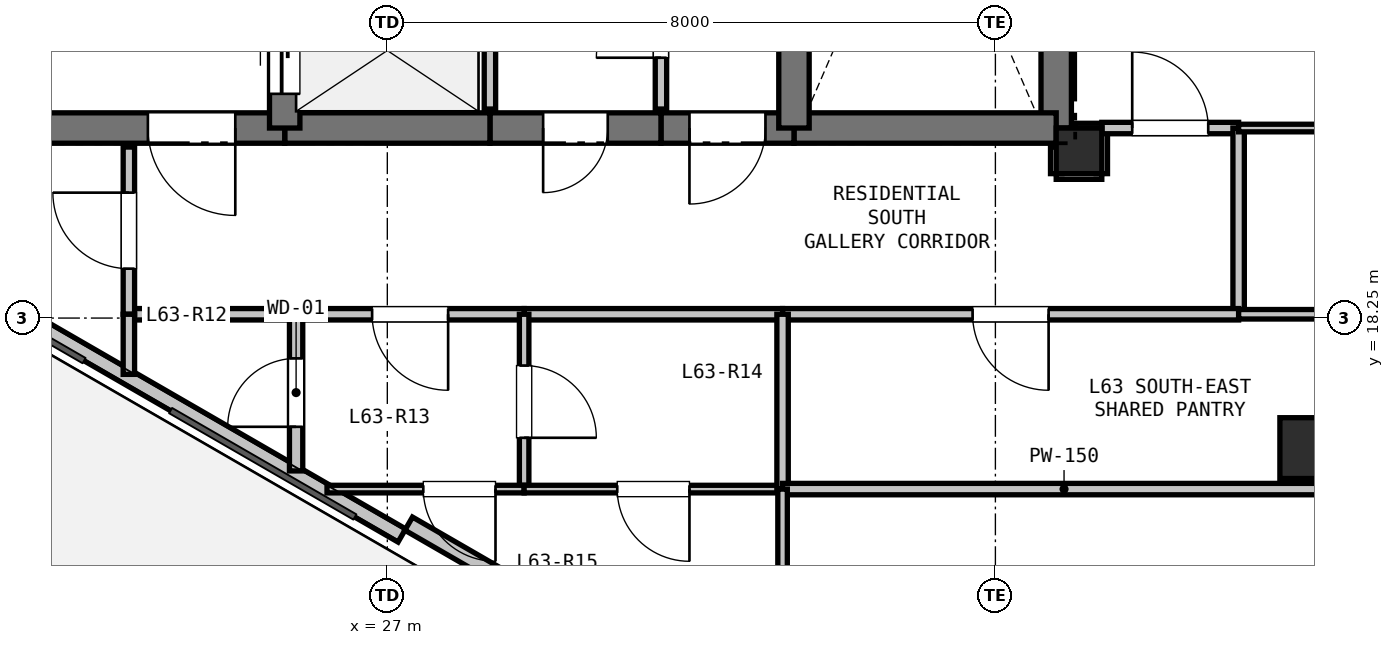
"""IFC4 building model, lengths in metres.
Left out: names, types, materials, properties, quantities, classifications, styles, units other than length and angle.
Written with IfcOpenShell. Run it as: python <this file> out.ifc"""

import sys

from ifc_helpers import new_model, si_unit, direction, frame, frame_2d, origin, origin_2d, place, context, subcontext, project, spatial, rectangle, hollow_rectangle, extrude, element, fill, save


model = new_model("IFC4")
c1 = context("Model", 3, precision=1e-05, world=origin(), true_north=direction((0.0, 1.0)))
c2 = subcontext(c1, "Body", "Model", "MODEL_VIEW")
j1 = project(units=[si_unit("LENGTHUNIT", "METRE"), si_unit("PLANEANGLEUNIT", "RADIAN")], contexts=[c1])
p1 = place(None, origin())
s1 = spatial("IfcSite", under=j1, at=p1, CompositionType="ELEMENT")
p2 = place(p1, origin())
s2 = spatial("IfcBuilding", under=s1, at=p2, CompositionType="ELEMENT")
p3 = place(p2, frame((0.0, 0.0, 226.5)))
s3 = spatial("IfcBuildingStorey", under=s2, at=p3, CompositionType="ELEMENT", Elevation=226.5)
p4 = place(p3, frame((36.1, 20.45, 0.0), z_axis=(0.0, 0.0, 1.0), x_axis=(1.0, 0.0, 0.0)))
e1 = element("IfcColumn", 1, at=p4, inside=s3, PredefinedType="COLUMN", context=c2, shape_type="SweptSolid", body=[
    extrude(rectangle(XDim=0.6, YDim=0.6, at=origin_2d()), origin(), (0.0, 0.0, 1.0), 3.3),
])
p5 = place(p3, frame((39.143, 16.539, 0.0), z_axis=(0.0, 0.0, 1.0), x_axis=(1.0, 0.0, 0.0)))
e2 = element("IfcColumn", 2, at=p5, inside=s3, PredefinedType="COLUMN", context=c2, shape_type="SweptSolid", body=[
    extrude(hollow_rectangle(XDim=0.8, YDim=0.8, WallThickness=0.025, at=origin_2d()), origin(), (0.0, 0.0, 1.0), 3.3),
])
p6 = place(p3, frame((27.191, 15.389, 0.0), z_axis=(0.0, 0.0, 1.0), x_axis=(-0.866019557082, 0.500010126649, 0.0)))
e3 = element("IfcWall", 3, at=p6, inside=s3, PredefinedType="PARAPET", context=c2, shape_type="SweptSolid", body=[
    extrude(rectangle(XDim=8.228, YDim=0.2, at=frame_2d((4.114, 0.0))), origin(), (0.0, 0.0, 1.0), 0.2),
])
p7 = place(p3, frame((28.754, 14.695, 0.0), z_axis=(0.0, 0.0, 1.0), x_axis=(-0.866025371046, 0.500000056704, 0.0)))
e4 = element("IfcWall", 4, at=p7, inside=s3, PredefinedType="PARAPET", context=c2, shape_type="SweptSolid", body=[
    extrude(rectangle(XDim=1.7, YDim=0.2, at=frame_2d((0.85, 0.0))), origin(), (0.0, 0.0, 1.0), 2.7),
])
p8 = place(p3, frame((35.8, 28.1, 0.0), z_axis=(0.0, 0.0, 1.0), x_axis=(0.0, -1.0, 0.0)))
e5 = element("IfcWall", 5, at=p8, inside=s3, PredefinedType="SHEAR", context=c2, shape_type="SweptSolid", body=[
    extrude(rectangle(XDim=7.35, YDim=0.4, at=frame_2d((3.675, 0.0))), origin(), (0.0, 0.0, 1.0), 3.08),
])
p9 = place(p3, frame((35.8, 20.75, 0.0), z_axis=(0.0, 0.0, 1.0), x_axis=(-1.0, 0.0, 0.0)))
e6 = element("IfcWall", 6, at=p9, inside=s3, PredefinedType="SHEAR", context=c2, shape_type="SweptSolid", body=[
    extrude(rectangle(XDim=3.45, YDim=0.4, at=frame_2d((1.725, 0.0))), origin(), (0.0, 0.0, 1.0), 3.08),
])
p10 = place(p3, frame((32.35, 20.75, 0.0), z_axis=(0.0, 0.0, 1.0), x_axis=(-1.0, 0.0, 0.0)))
e7 = element("IfcWall", 7, at=p10, inside=s3, PredefinedType="SHEAR", context=c2, shape_type="SweptSolid", body=[
    extrude(rectangle(XDim=1.75, YDim=0.4, at=frame_2d((0.875, 0.0))), origin(), (0.0, 0.0, 1.0), 3.08),
])
p11 = place(p10, frame((0.375, 0.0, 0.0)))
e8 = element("IfcOpeningElement", 8, at=p11, cuts=e7, PredefinedType="OPENING", context=c2, shape_type="SweptSolid", body=[
    extrude(rectangle(XDim=1.0, YDim=2.15, at=frame_2d((0.5, 1.075))), frame((0.0, 0.21, 0.0), z_axis=(0.0, -1.0, 0.0), x_axis=(1.0, 0.0, 0.0)), (0.0, 0.0, 1.0), 0.42),
])
p12 = place(p3, frame((30.6, 20.75, 0.0), z_axis=(0.0, 0.0, 1.0), x_axis=(-1.0, 0.0, 0.0)))
e9 = element("IfcWall", 9, at=p12, inside=s3, PredefinedType="SHEAR", context=c2, shape_type="SweptSolid", body=[
    extrude(rectangle(XDim=2.25, YDim=0.4, at=frame_2d((1.125, 0.0))), origin(), (0.0, 0.0, 1.0), 3.08),
])
p13 = place(p12, frame((0.7, 0.0, 0.0)))
e10 = element("IfcOpeningElement", 10, at=p13, cuts=e9, PredefinedType="OPENING", context=c2, shape_type="SweptSolid", body=[
    extrude(rectangle(XDim=0.85, YDim=2.1, at=frame_2d((0.425, 1.05))), frame((0.0, 0.21, 0.0), z_axis=(0.0, -1.0, 0.0), x_axis=(1.0, 0.0, 0.0)), (0.0, 0.0, 1.0), 0.42),
])
p14 = place(p3, frame((28.35, 20.75, 0.0), z_axis=(0.0, 0.0, 1.0), x_axis=(-1.0, 0.0, 0.0)))
e11 = element("IfcWall", 11, at=p14, inside=s3, PredefinedType="SHEAR", context=c2, shape_type="SweptSolid", body=[
    extrude(rectangle(XDim=2.7, YDim=0.4, at=frame_2d((1.35, 0.0))), origin(), (0.0, 0.0, 1.0), 3.08),
])
p15 = place(p3, frame((25.65, 20.75, 0.0), z_axis=(0.0, 0.0, 1.0), x_axis=(-1.0, 0.0, 0.0)))
e12 = element("IfcWall", 12, at=p15, inside=s3, PredefinedType="SHEAR", context=c2, shape_type="SweptSolid", body=[
    extrude(rectangle(XDim=3.45, YDim=0.4, at=frame_2d((1.725, 0.0))), origin(), (0.0, 0.0, 1.0), 3.08),
])
p16 = place(p15, frame((0.65, 0.0, 0.0)))
e13 = element("IfcOpeningElement", 13, at=p16, cuts=e12, PredefinedType="OPENING", context=c2, shape_type="SweptSolid", body=[
    extrude(rectangle(XDim=1.15, YDim=2.15, at=frame_2d((0.575, 1.075))), frame((0.0, 0.21, 0.0), z_axis=(0.0, -1.0, 0.0), x_axis=(1.0, 0.0, 0.0)), (0.0, 0.0, 1.0), 0.42),
])
p17 = place(p3, frame((25.65, 20.75, 0.0), z_axis=(0.0, 0.0, 1.0), x_axis=(0.0, 1.0, 0.0)))
e14 = element("IfcWall", 14, at=p17, inside=s3, PredefinedType="SHEAR", context=c2, shape_type="SweptSolid", body=[
    extrude(rectangle(XDim=2.0, YDim=0.4, at=frame_2d((1.0, 0.0))), origin(), (0.0, 0.0, 1.0), 3.08),
])
p18 = place(p17, frame((0.45, 0.0, 0.0)))
e15 = element("IfcOpeningElement", 15, at=p18, cuts=e14, PredefinedType="OPENING", context=c2, shape_type="SweptSolid", body=[
    extrude(rectangle(XDim=1.1, YDim=2.15, at=frame_2d((0.55, 1.075))), frame((0.0, 0.21, 0.0), z_axis=(0.0, -1.0, 0.0), x_axis=(1.0, 0.0, 0.0)), (0.0, 0.0, 1.0), 0.42),
])
p19 = place(p3, frame((32.35, 20.75, 0.0), z_axis=(0.0, 0.0, 1.0), x_axis=(0.0, 1.0, 0.0)))
e16 = element("IfcWall", 16, at=p19, inside=s3, PredefinedType="SHEAR", context=c2, shape_type="SweptSolid", body=[
    extrude(rectangle(XDim=4.8, YDim=0.4, at=frame_2d((2.4, 0.0))), origin(), (0.0, 0.0, 1.0), 3.08),
])
p20 = place(p3, frame((28.35, 23.2, 0.0), z_axis=(0.0, 0.0, 1.0), x_axis=(0.0, -1.0, 0.0)))
e17 = element("IfcWall", 17, at=p20, inside=s3, PredefinedType="PARTITIONING", context=c2, shape_type="SweptSolid", body=[
    extrude(rectangle(XDim=2.2, YDim=0.15, at=frame_2d((1.1, 0.0))), origin(), (0.0, 0.0, 1.0), 3.08),
])
p21 = place(p3, frame((30.6, 21.0, 0.0), z_axis=(0.0, 0.0, 1.0), x_axis=(0.0, 1.0, 0.0)))
e18 = element("IfcWall", 18, at=p21, inside=s3, PredefinedType="PARTITIONING", context=c2, shape_type="SweptSolid", body=[
    extrude(rectangle(XDim=2.2, YDim=0.15, at=frame_2d((1.1, 0.0))), origin(), (0.0, 0.0, 1.0), 3.08),
])
p22 = place(p21, frame((0.675, 0.0, 0.0)))
e19 = element("IfcOpeningElement", 19, at=p22, cuts=e18, PredefinedType="OPENING", context=c2, shape_type="SweptSolid", body=[
    extrude(rectangle(XDim=0.85, YDim=2.1, at=frame_2d((0.425, 1.05))), frame((0.0, 0.085, 0.0), z_axis=(0.0, -1.0, 0.0), x_axis=(1.0, 0.0, 0.0)), (0.0, 0.0, 1.0), 0.17),
])
p23 = place(p3, frame((35.8, 20.15, 0.0), z_axis=(0.0, 0.0, 1.0), x_axis=(1.0, 0.0, 0.0)))
e20 = element("IfcWall", 20, at=p23, inside=s3, PredefinedType="PARTITIONING", context=c2, shape_type="SweptSolid", body=[
    extrude(rectangle(XDim=0.6, YDim=0.15, at=frame_2d((0.3, 0.0))), origin(), (0.0, 0.0, 1.0), 2.528),
])
p24 = place(p3, frame((36.4, 20.15, 0.0), z_axis=(0.0, 0.0, 1.0), x_axis=(0.0, 1.0, 0.0)))
e21 = element("IfcWall", 21, at=p24, inside=s3, PredefinedType="PARTITIONING", context=c2, shape_type="SweptSolid", body=[
    extrude(rectangle(XDim=0.6, YDim=0.15, at=frame_2d((0.3, 0.0))), origin(), (0.0, 0.0, 1.0), 3.08),
])
p25 = place(p3, frame((36.4, 20.75, 0.0), z_axis=(0.0, 0.0, 1.0), x_axis=(1.0, 0.0, 0.0)))
e22 = element("IfcWall", 22, at=p25, inside=s3, PredefinedType="PARTITIONING", context=c2, shape_type="SweptSolid", body=[
    extrude(rectangle(XDim=1.8, YDim=0.15, at=frame_2d((0.9, 0.0))), origin(), (0.0, 0.0, 1.0), 3.08),
])
p26 = place(p25, frame((0.4, 0.0, 0.0)))
e23 = element("IfcOpeningElement", 23, at=p26, cuts=e22, PredefinedType="OPENING", context=c2, shape_type="SweptSolid", body=[
    extrude(rectangle(XDim=1.0, YDim=2.15, at=frame_2d((0.5, 1.075))), frame((0.0, 0.085, 0.0), z_axis=(0.0, -1.0, 0.0), x_axis=(1.0, 0.0, 0.0)), (0.0, 0.0, 1.0), 0.17),
])
p27 = place(p3, frame((38.2, 20.75, 0.0), z_axis=(0.0, 0.0, 1.0), x_axis=(0.0, -1.0, 0.0)))
e24 = element("IfcWall", 24, at=p27, inside=s3, PredefinedType="PARTITIONING", context=c2, shape_type="SweptSolid", body=[
    extrude(rectangle(XDim=2.45, YDim=0.15, at=frame_2d((1.225, 0.0))), origin(), (0.0, 0.0, 1.0), 3.08),
])
p28 = place(p3, frame((38.2, 18.3, 0.0), z_axis=(0.0, 0.0, 1.0), x_axis=(-1.0, 0.0, 0.0)))
e25 = element("IfcWall", 25, at=p28, inside=s3, PredefinedType="PARTITIONING", context=c2, shape_type="SweptSolid", body=[
    extrude(rectangle(XDim=6.0, YDim=0.15, at=frame_2d((3.0, 0.0))), origin(), (0.0, 0.0, 1.0), 2.528),
])
p29 = place(p28, frame((2.5, 0.0, 0.0)))
e26 = element("IfcOpeningElement", 26, at=p29, cuts=e25, PredefinedType="OPENING", context=c2, shape_type="SweptSolid", body=[
    extrude(rectangle(XDim=1.0, YDim=2.15, at=frame_2d((0.5, 1.075))), frame((0.0, 0.085, 0.0), z_axis=(0.0, -1.0, 0.0), x_axis=(1.0, 0.0, 0.0)), (0.0, 0.0, 1.0), 0.17),
])
p30 = place(p3, frame((32.2, 18.3, 0.0), z_axis=(0.0, 0.0, 1.0), x_axis=(-1.0, 0.0, 0.0)))
e27 = element("IfcWall", 27, at=p30, inside=s3, PredefinedType="PARTITIONING", context=c2, shape_type="SweptSolid", body=[
    extrude(rectangle(XDim=3.4, YDim=0.15, at=frame_2d((1.7, 0.0))), origin(), (0.0, 0.0, 1.0), 3.08),
])
p31 = place(p3, frame((28.8, 18.3, 0.0), z_axis=(0.0, 0.0, 1.0), x_axis=(-1.0, 0.0, 0.0)))
e28 = element("IfcWall", 28, at=p31, inside=s3, PredefinedType="PARTITIONING", context=c2, shape_type="SweptSolid", body=[
    extrude(rectangle(XDim=3.0, YDim=0.15, at=frame_2d((1.5, 0.0))), origin(), (0.0, 0.0, 1.0), 3.08),
])
p32 = place(p31, frame((1.0, 0.0, 0.0)))
e29 = element("IfcOpeningElement", 29, at=p32, cuts=e28, PredefinedType="OPENING", context=c2, shape_type="SweptSolid", body=[
    extrude(rectangle(XDim=1.0, YDim=2.15, at=frame_2d((0.5, 1.075))), frame((0.0, 0.085, 0.0), z_axis=(0.0, -1.0, 0.0), x_axis=(1.0, 0.0, 0.0)), (0.0, 0.0, 1.0), 0.17),
])
p33 = place(p3, frame((25.8, 18.3, 0.0), z_axis=(0.0, 0.0, 1.0), x_axis=(-1.0, 0.0, 0.0)))
e30 = element("IfcWall", 30, at=p33, inside=s3, PredefinedType="PARTITIONING", context=c2, shape_type="SweptSolid", body=[
    extrude(rectangle(XDim=2.2, YDim=0.15, at=frame_2d((1.1, 0.0))), origin(), (0.0, 0.0, 1.0), 2.365),
])
p34 = place(p3, frame((23.6, 18.3, 0.0), z_axis=(0.0, 0.0, 1.0), x_axis=(0.0, 1.0, 0.0)))
e31 = element("IfcWall", 31, at=p34, inside=s3, PredefinedType="PARTITIONING", context=c2, shape_type="SweptSolid", body=[
    extrude(rectangle(XDim=2.2, YDim=0.15, at=frame_2d((1.1, 0.0))), origin(), (0.0, 0.0, 1.0), 2.528),
])
p35 = place(p34, frame((0.6, 0.0, 0.0)))
e32 = element("IfcOpeningElement", 32, at=p35, cuts=e31, PredefinedType="OPENING", context=c2, shape_type="SweptSolid", body=[
    extrude(rectangle(XDim=1.0, YDim=2.15, at=frame_2d((0.5, 1.075))), frame((0.0, 0.085, 0.0), z_axis=(0.0, -1.0, 0.0), x_axis=(1.0, 0.0, 0.0)), (0.0, 0.0, 1.0), 0.17),
])
p36 = place(p3, frame((35.8, 20.5, 0.0), z_axis=(0.0, 0.0, 1.0), x_axis=(0.0, -1.0, 0.0)))
e33 = element("IfcWall", 33, at=p36, inside=s3, PredefinedType="PARTITIONING", context=c2, shape_type="SweptSolid", body=[
    extrude(rectangle(XDim=0.35, YDim=0.15, at=frame_2d((0.175, 0.0))), origin(), (0.0, 0.0, 1.0), 2.605),
])
p37 = place(p3, frame((28.8, 18.3, 0.0), z_axis=(0.0, 0.0, 1.0), x_axis=(0.0, -1.0, 0.0)))
e34 = element("IfcWall", 34, at=p37, inside=s3, PredefinedType="PARTITIONING", context=c2, shape_type="SweptSolid", body=[
    extrude(rectangle(XDim=2.3, YDim=0.125, at=frame_2d((1.15, 0.0))), origin(), (0.0, 0.0, 1.0), 3.08),
])
p38 = place(p37, frame((0.675, 0.0, 0.0)))
e35 = element("IfcOpeningElement", 35, at=p38, cuts=e34, PredefinedType="OPENING", context=c2, shape_type="SweptSolid", body=[
    extrude(rectangle(XDim=0.95, YDim=2.1, at=frame_2d((0.475, 1.05))), frame((0.0, 0.073, 0.0), z_axis=(0.0, -1.0, 0.0), x_axis=(1.0, 0.0, 0.0)), (0.0, 0.0, 1.0), 0.145),
])
p39 = place(p3, frame((28.8, 16.0, 0.0), z_axis=(0.0, 0.0, 1.0), x_axis=(-1.0, 0.0, 0.0)))
e36 = element("IfcWall", 36, at=p39, inside=s3, PredefinedType="PARTITIONING", context=c2, shape_type="SweptSolid", body=[
    extrude(rectangle(XDim=2.594, YDim=0.1, at=frame_2d((1.297, 0.0))), origin(), (0.0, 0.0, 1.0), 2.365),
])
p40 = place(p39, frame((0.377, 0.0, 0.0)))
e37 = element("IfcOpeningElement", 37, at=p40, cuts=e36, PredefinedType="OPENING", context=c2, shape_type="SweptSolid", body=[
    extrude(rectangle(XDim=0.95, YDim=2.1, at=frame_2d((0.475, 1.05))), frame((0.0, 0.06, 0.0), z_axis=(0.0, -1.0, 0.0), x_axis=(1.0, 0.0, 0.0)), (0.0, 0.0, 1.0), 0.12),
])
p41 = place(p3, frame((25.8, 16.239, 0.0), z_axis=(0.0, 0.0, 1.0), x_axis=(0.0, 1.0, 0.0)))
e38 = element("IfcWall", 38, at=p41, inside=s3, PredefinedType="PLUMBINGWALL", context=c2, shape_type="SweptSolid", body=[
    extrude(rectangle(XDim=2.061, YDim=0.175, at=frame_2d((1.031, 0.0))), origin(), (0.0, 0.0, 1.0), 2.365),
])
p42 = place(p41, frame((0.581, 0.0, 0.0)))
e39 = element("IfcOpeningElement", 39, at=p42, cuts=e38, PredefinedType="OPENING", context=c2, shape_type="SweptSolid", body=[
    extrude(rectangle(XDim=0.9, YDim=2.1, at=frame_2d((0.45, 1.05))), frame((0.0, 0.097, 0.0), z_axis=(0.0, -1.0, 0.0), x_axis=(1.0, 0.0, 0.0)), (0.0, 0.0, 1.0), 0.195),
])
p43 = place(p3, frame((23.6, 17.509, 0.0), z_axis=(0.0, 0.0, 1.0), x_axis=(0.0, 1.0, 0.0)))
e40 = element("IfcWall", 40, at=p43, inside=s3, PredefinedType="PARTITIONING", context=c2, shape_type="SweptSolid", body=[
    extrude(rectangle(XDim=0.791, YDim=0.15, at=frame_2d((0.396, 0.0))), origin(), (0.0, 0.0, 1.0), 2.365),
])
p44 = place(p3, frame((32.2, 16.0, 0.0), z_axis=(0.0, 0.0, 1.0), x_axis=(-1.0, 0.0, 0.0)))
e41 = element("IfcWall", 41, at=p44, inside=s3, PredefinedType="PARTITIONING", context=c2, shape_type="SweptSolid", body=[
    extrude(rectangle(XDim=3.4, YDim=0.1, at=frame_2d((1.7, 0.0))), origin(), (0.0, 0.0, 1.0), 3.08),
])
p45 = place(p44, frame((1.225, 0.0, 0.0)))
e42 = element("IfcOpeningElement", 42, at=p45, cuts=e41, PredefinedType="OPENING", context=c2, shape_type="SweptSolid", body=[
    extrude(rectangle(XDim=0.95, YDim=2.1, at=frame_2d((0.475, 1.05))), frame((0.0, 0.06, 0.0), z_axis=(0.0, -1.0, 0.0), x_axis=(1.0, 0.0, 0.0)), (0.0, 0.0, 1.0), 0.12),
])
p46 = place(p3, frame((32.2, 18.3, 0.0), z_axis=(0.0, 0.0, 1.0), x_axis=(0.0, -1.0, 0.0)))
e43 = element("IfcWall", 43, at=p46, inside=s3, PredefinedType="PARTITIONING", context=c2, shape_type="SweptSolid", body=[
    extrude(rectangle(XDim=2.3, YDim=0.15, at=frame_2d((1.15, 0.0))), origin(), (0.0, 0.0, 1.0), 3.08),
])
p47 = place(p3, frame((38.2, 18.3, 0.0), z_axis=(0.0, 0.0, 1.0), x_axis=(1.0, 0.0, 0.0)))
e44 = element("IfcWall", 44, at=p47, inside=s3, PredefinedType="PARTITIONING", context=c2, shape_type="SweptSolid", body=[
    extrude(rectangle(XDim=1.406, YDim=0.125, at=frame_2d((0.703, 0.0))), origin(), (0.0, 0.0, 1.0), 2.365),
])
p48 = place(p3, frame((39.606, 16.0, 0.0), z_axis=(0.0, 0.0, 1.0), x_axis=(-1.0, 0.0, 0.0)))
e45 = element("IfcWall", 45, at=p48, inside=s3, PredefinedType="PARTITIONING", context=c2, shape_type="SweptSolid", body=[
    extrude(rectangle(XDim=7.406, YDim=0.15, at=frame_2d((3.703, 0.0))), origin(), (0.0, 0.0, 1.0), 2.528),
])
p49 = place(p3, frame((39.606, 20.75, 0.0), z_axis=(0.0, 0.0, 1.0), x_axis=(-1.0, 0.0, 0.0)))
e46 = element("IfcWall", 46, at=p49, inside=s3, PredefinedType="PARTITIONING", context=c2, shape_type="SweptSolid", body=[
    extrude(rectangle(XDim=1.406, YDim=0.1, at=frame_2d((0.703, 0.0))), origin(), (0.0, 0.0, 1.0), 2.365),
])
p50 = place(p3, frame((36.4, 20.75, 0.0), z_axis=(0.0, 0.0, 1.0), x_axis=(-1.0, 0.0, 0.0)))
e47 = element("IfcWall", 47, at=p50, inside=s3, PredefinedType="PARTITIONING", context=c2, shape_type="SweptSolid", body=[
    extrude(rectangle(XDim=0.35, YDim=0.125, at=frame_2d((0.175, 0.0))), origin(), (0.0, 0.0, 1.0), 2.605),
])
p51 = place(p3, frame((32.2, 16.0, 0.0), z_axis=(0.0, 0.0, 1.0), x_axis=(0.0, -1.0, 0.0)))
e48 = element("IfcWall", 48, at=p51, inside=s3, PredefinedType="PARTITIONING", context=c2, shape_type="SweptSolid", body=[
    extrude(rectangle(XDim=3.344, YDim=0.125, at=frame_2d((1.672, 0.0))), origin(), (0.0, 0.0, 1.0), 2.365),
])
p52 = place(p51, frame((1.197, 0.0, 0.0)))
e49 = element("IfcOpeningElement", 49, at=p52, cuts=e48, PredefinedType="OPENING", context=c2, shape_type="SweptSolid", body=[
    extrude(rectangle(XDim=0.95, YDim=2.1, at=frame_2d((0.475, 1.05))), frame((0.0, 0.073, 0.0), z_axis=(0.0, -1.0, 0.0), x_axis=(1.0, 0.0, 0.0)), (0.0, 0.0, 1.0), 0.145),
])
p53 = place(p11, origin())
e50 = element("IfcDoor", 50, at=p53, inside=s3, OperationType="SINGLE_SWING_RIGHT", PredefinedType="DOOR", context=c2, shape_type="SweptSolid", body=[
    extrude(rectangle(XDim=1.0, YDim=2.15, at=frame_2d((0.5, 1.075))), frame((0.0, 0.025, 0.0), z_axis=(0.0, -1.0, 0.0), x_axis=(1.0, 0.0, 0.0)), (0.0, 0.0, 1.0), 0.05),
])
fill(e8, e50)
p54 = place(p18, origin())
e51 = element("IfcDoor", 51, at=p54, inside=s3, OperationType="SLIDING_TO_LEFT", PredefinedType="DOOR", context=c2, shape_type="SweptSolid", body=[
    extrude(rectangle(XDim=1.1, YDim=2.15, at=frame_2d((0.55, 1.075))), frame((0.0, 0.025, 0.0), z_axis=(0.0, -1.0, 0.0), x_axis=(1.0, 0.0, 0.0)), (0.0, 0.0, 1.0), 0.05),
])
fill(e15, e51)
p55 = place(p16, origin())
e52 = element("IfcDoor", 52, at=p55, inside=s3, OperationType="SINGLE_SWING_LEFT", PredefinedType="DOOR", context=c2, shape_type="SweptSolid", body=[
    extrude(rectangle(XDim=1.15, YDim=2.15, at=frame_2d((0.575, 1.075))), frame((0.0, 0.025, 0.0), z_axis=(0.0, -1.0, 0.0), x_axis=(1.0, 0.0, 0.0)), (0.0, 0.0, 1.0), 0.05),
])
fill(e13, e52)
p56 = place(p22, origin())
e53 = element("IfcDoor", 53, at=p56, inside=s3, OperationType="SINGLE_SWING_LEFT", PredefinedType="DOOR", context=c2, shape_type="SweptSolid", body=[
    extrude(rectangle(XDim=0.85, YDim=2.1, at=frame_2d((0.425, 1.05))), frame((0.0, 0.025, 0.0), z_axis=(0.0, -1.0, 0.0), x_axis=(1.0, 0.0, 0.0)), (0.0, 0.0, 1.0), 0.05),
])
fill(e19, e53)
p57 = place(p32, origin())
e54 = element("IfcDoor", 54, at=p57, inside=s3, OperationType="SINGLE_SWING_LEFT", PredefinedType="DOOR", context=c2, shape_type="SweptSolid", body=[
    extrude(rectangle(XDim=1.0, YDim=2.15, at=frame_2d((0.5, 1.075))), frame((0.0, 0.025, 0.0), z_axis=(0.0, -1.0, 0.0), x_axis=(1.0, 0.0, 0.0)), (0.0, 0.0, 1.0), 0.05),
])
fill(e29, e54)
p58 = place(p13, origin())
e55 = element("IfcDoor", 55, at=p58, inside=s3, OperationType="SINGLE_SWING_RIGHT", PredefinedType="DOOR", context=c2, shape_type="SweptSolid", body=[
    extrude(rectangle(XDim=0.85, YDim=2.1, at=frame_2d((0.425, 1.05))), frame((0.0, 0.025, 0.0), z_axis=(0.0, -1.0, 0.0), x_axis=(1.0, 0.0, 0.0)), (0.0, 0.0, 1.0), 0.05),
])
fill(e10, e55)
p59 = place(p29, origin())
e56 = element("IfcDoor", 56, at=p59, inside=s3, OperationType="SINGLE_SWING_LEFT", PredefinedType="DOOR", context=c2, shape_type="SweptSolid", body=[
    extrude(rectangle(XDim=1.0, YDim=2.15, at=frame_2d((0.5, 1.075))), frame((0.0, 0.025, 0.0), z_axis=(0.0, -1.0, 0.0), x_axis=(1.0, 0.0, 0.0)), (0.0, 0.0, 1.0), 0.05),
])
fill(e26, e56)
p60 = place(p35, origin())
e57 = element("IfcDoor", 57, at=p60, inside=s3, OperationType="SINGLE_SWING_RIGHT", PredefinedType="DOOR", context=c2, shape_type="SweptSolid", body=[
    extrude(rectangle(XDim=1.0, YDim=2.15, at=frame_2d((0.5, 1.075))), frame((0.0, 0.025, 0.0), z_axis=(0.0, -1.0, 0.0), x_axis=(1.0, 0.0, 0.0)), (0.0, 0.0, 1.0), 0.05),
])
fill(e32, e57)
p61 = place(p26, origin())
e58 = element("IfcDoor", 58, at=p61, inside=s3, OperationType="SINGLE_SWING_LEFT", PredefinedType="DOOR", context=c2, shape_type="SweptSolid", body=[
    extrude(rectangle(XDim=1.0, YDim=2.15, at=frame_2d((0.5, 1.075))), frame((0.0, 0.025, 0.0), z_axis=(0.0, -1.0, 0.0), x_axis=(1.0, 0.0, 0.0)), (0.0, 0.0, 1.0), 0.05),
])
fill(e23, e58)
p62 = place(p42, origin())
e59 = element("IfcDoor", 59, at=p62, inside=s3, OperationType="SINGLE_SWING_LEFT", PredefinedType="DOOR", context=c2, shape_type="SweptSolid", body=[
    extrude(rectangle(XDim=0.9, YDim=2.1, at=frame_2d((0.45, 1.05))), frame((0.0, 0.025, 0.0), z_axis=(0.0, -1.0, 0.0), x_axis=(1.0, 0.0, 0.0)), (0.0, 0.0, 1.0), 0.05),
])
fill(e39, e59)
p63 = place(p38, origin())
e60 = element("IfcDoor", 60, at=p63, inside=s3, OperationType="SINGLE_SWING_RIGHT", PredefinedType="DOOR", context=c2, shape_type="SweptSolid", body=[
    extrude(rectangle(XDim=0.95, YDim=2.1, at=frame_2d((0.475, 1.05))), frame((0.0, 0.025, 0.0), z_axis=(0.0, -1.0, 0.0), x_axis=(1.0, 0.0, 0.0)), (0.0, 0.0, 1.0), 0.05),
])
fill(e35, e60)
p64 = place(p40, origin())
e61 = element("IfcDoor", 61, at=p64, inside=s3, OperationType="SINGLE_SWING_LEFT", PredefinedType="DOOR", context=c2, shape_type="SweptSolid", body=[
    extrude(rectangle(XDim=0.95, YDim=2.1, at=frame_2d((0.475, 1.05))), frame((0.0, 0.025, 0.0), z_axis=(0.0, -1.0, 0.0), x_axis=(1.0, 0.0, 0.0)), (0.0, 0.0, 1.0), 0.05),
])
fill(e37, e61)
p65 = place(p45, origin())
e62 = element("IfcDoor", 62, at=p65, inside=s3, OperationType="SINGLE_SWING_LEFT", PredefinedType="DOOR", context=c2, shape_type="SweptSolid", body=[
    extrude(rectangle(XDim=0.95, YDim=2.1, at=frame_2d((0.475, 1.05))), frame((0.0, 0.025, 0.0), z_axis=(0.0, -1.0, 0.0), x_axis=(1.0, 0.0, 0.0)), (0.0, 0.0, 1.0), 0.05),
])
fill(e42, e62)
save(model, sys.argv[1])
